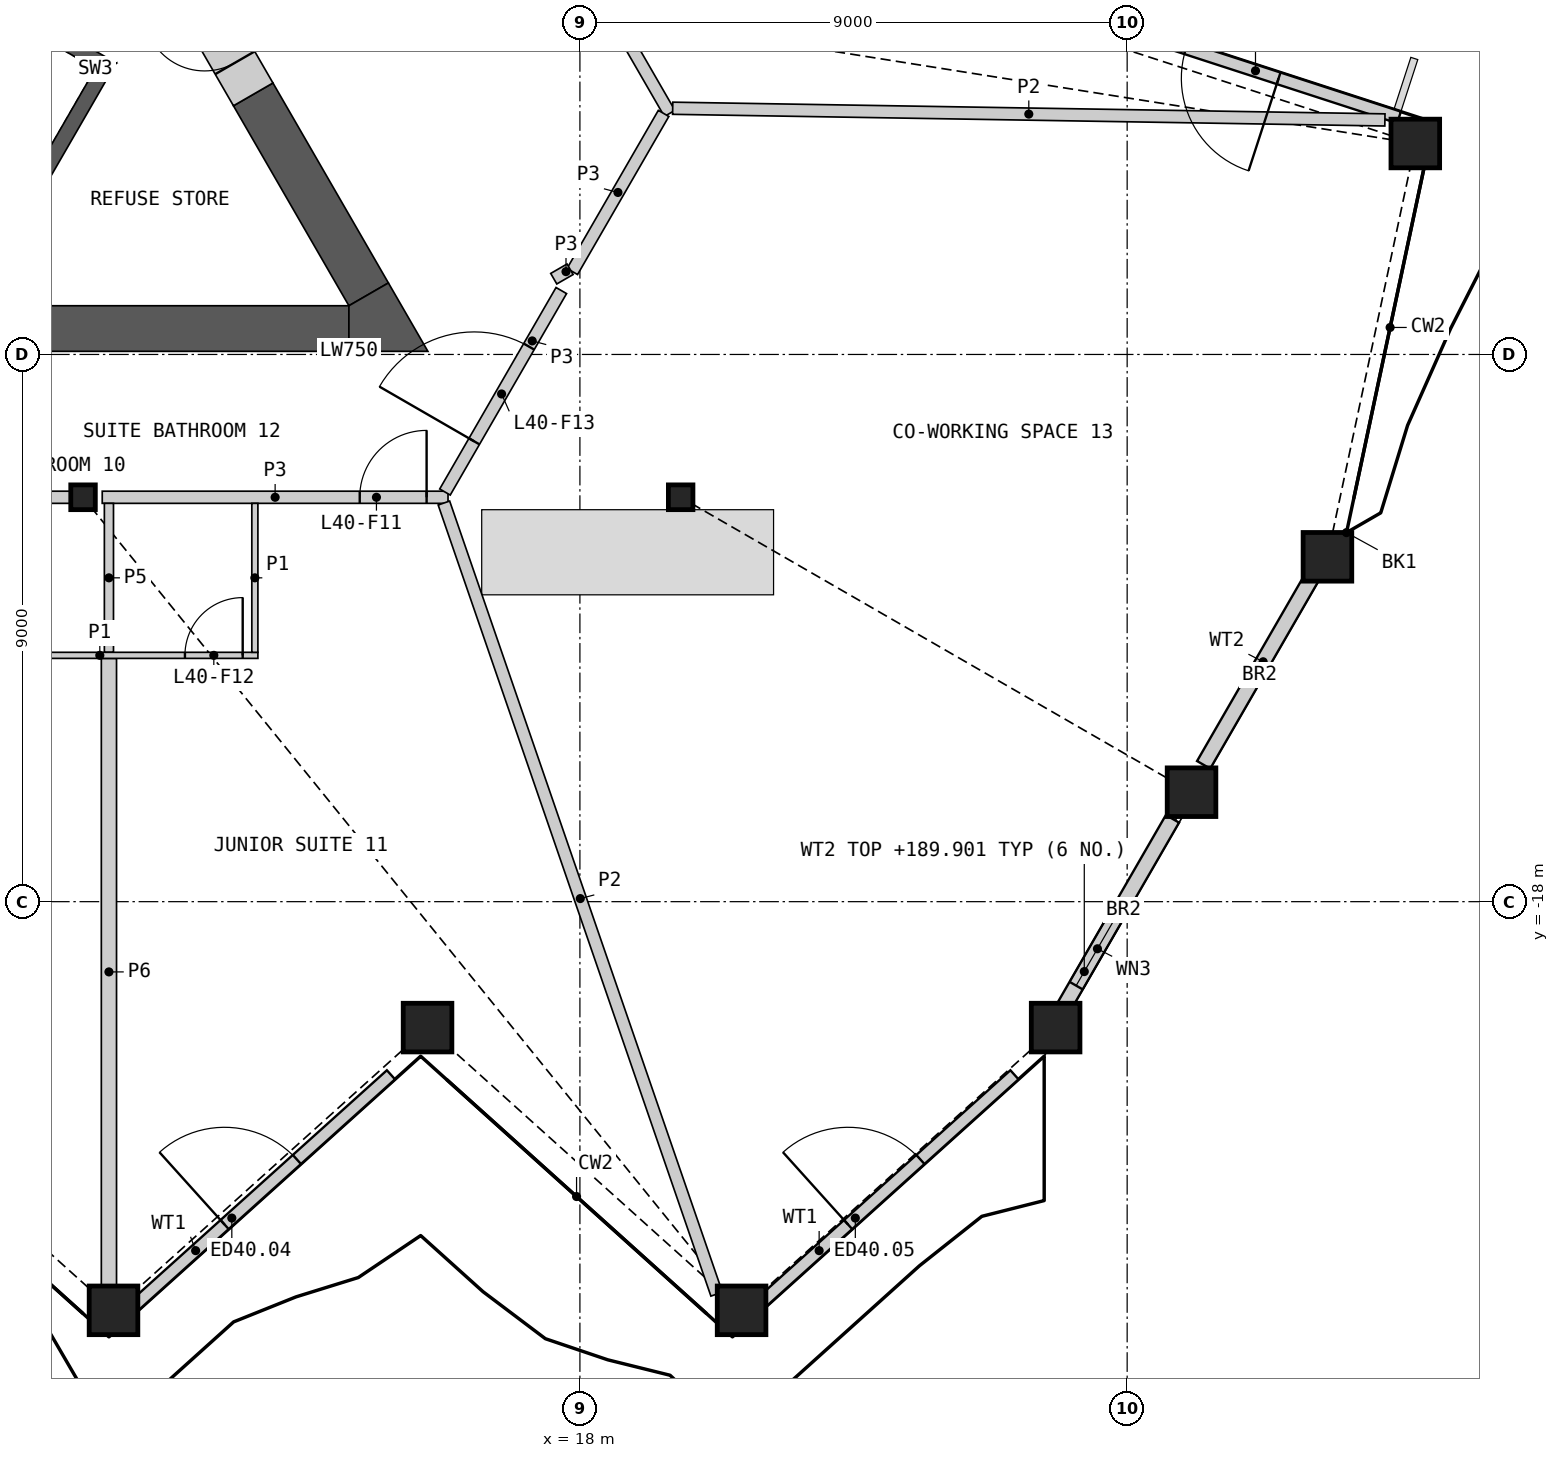
"""IFC4 building model, lengths in metres.
Left out: names, types, materials, properties, quantities, classifications, styles, units other than length and angle.
Written with IfcOpenShell. Run it as: python <this file> out.ifc"""

import sys

from ifc_helpers import new_model, si_unit, direction, frame, frame_2d, origin, origin_2d, place, context, subcontext, project, spatial, polyline, rectangle, hollow_rectangle, i_section, outline, extrude, element, fill, save


model = new_model("IFC4")
c1 = context("Model", 3, precision=1e-05, world=origin(), true_north=direction((0.0, 1.0)))
c2 = subcontext(c1, "Body", "Model", "MODEL_VIEW")
j1 = project(units=[si_unit("LENGTHUNIT", "METRE"), si_unit("PLANEANGLEUNIT", "RADIAN")], contexts=[c1])
p1 = place(None, origin())
s1 = spatial("IfcSite", under=j1, at=p1, CompositionType="ELEMENT")
p2 = place(p1, origin())
s2 = spatial("IfcBuilding", under=s1, at=p2, CompositionType="ELEMENT")
p3 = place(p2, frame((0.0, 0.0, 187.2)))
s3 = spatial("IfcBuildingStorey", under=s2, at=p3, CompositionType="ELEMENT", Elevation=187.2)
for number, where, z_axis, x_axis in (
    (1, (10.329, -24.722, 0.0), (0.0, 0.0, 1.0), (1.0, 0.0, 0.0)),
    (2, (15.494, -20.071, 0.0), (0.0, 0.0, 1.0), (1.0, 0.0, 0.0)),
    (3, (20.659, -24.722, 0.0), (0.0, 0.0, 1.0), (1.0, 0.0, 0.0)),
    (4, (25.823, -20.071, 0.0), (0.0, 0.0, 1.0), (1.0, 0.0, 0.0)),
    (5, (28.059, -16.2, 0.0), (0.0, 0.0, 1.0), (1.0, 0.0, 0.0)),
    (6, (30.294, -12.328, 0.0), (0.0, 0.0, 1.0), (1.0, 0.0, 0.0)),
    (7, (31.739, -5.53, 0.0), (0.0, 0.0, 1.0), (1.0, 0.0, 0.0)),
):
    element("IfcColumn", number, at=place(p3, frame(where, z_axis=z_axis, x_axis=x_axis)), inside=s3, PredefinedType="COLUMN", context=c2, shape_type="SweptSolid", body=[
        extrude(hollow_rectangle(XDim=0.8, YDim=0.8, WallThickness=0.05, at=origin_2d()), origin(), (0.0, 0.0, 1.0), 3.6),
    ])
for number, where, z_axis, x_axis in (
    (8, (9.828, -11.349, 0.0), (0.0, 0.0, 1.0), (1.0, 0.0, 0.0)),
    (9, (19.657, -11.349, 0.0), (0.0, 0.0, 1.0), (1.0, 0.0, 0.0)),
):
    element("IfcColumn", number, at=place(p3, frame(where, z_axis=z_axis, x_axis=x_axis)), inside=s3, PredefinedType="COLUMN", context=c2, shape_type="SweptSolid", body=[
        extrude(i_section(OverallWidth=0.404, OverallDepth=0.407, WebThickness=0.027, FlangeThickness=0.044, at=origin_2d()), origin(), (0.0, 0.0, 1.0), 3.6),
    ])
p4 = place(p3, frame((10.609, -24.704, 0.0), z_axis=(0.0, 0.0, 1.0), x_axis=(0.743140362926, 0.669135562491, 0.0)))
e10 = element("IfcWall", 10, at=p4, inside=s3, PredefinedType="SOLIDWALL", context=c2, shape_type="SweptSolid", body=[
    extrude(rectangle(XDim=5.763, YDim=0.2, at=frame_2d((2.882, 0.0))), origin(), (0.0, 0.0, 1.0), 2.701),
])
p5 = place(p4, frame((2.082, 0.0, 0.0)))
e11 = element("IfcOpeningElement", 11, at=p5, cuts=e10, PredefinedType="OPENING", context=c2, shape_type="SweptSolid", body=[
    extrude(rectangle(XDim=1.6, YDim=2.4, at=frame_2d((0.8, 1.2))), frame((0.0, 0.11, 0.0), z_axis=(0.0, -1.0, 0.0), x_axis=(1.0, 0.0, 0.0)), (0.0, 0.0, 1.0), 0.22),
])
p6 = place(p3, frame((20.864, -24.704, 0.0), z_axis=(0.0, 0.0, 1.0), x_axis=(0.743140362926, 0.669135562491, 0.0)))
e12 = element("IfcWall", 12, at=p6, inside=s3, PredefinedType="SOLIDWALL", context=c2, shape_type="SweptSolid", body=[
    extrude(rectangle(XDim=5.763, YDim=0.2, at=frame_2d((2.882, 0.0))), origin(), (0.0, 0.0, 1.0), 2.701),
])
p7 = place(p6, frame((2.082, 0.0, 0.0)))
e13 = element("IfcOpeningElement", 13, at=p7, cuts=e12, PredefinedType="OPENING", context=c2, shape_type="SweptSolid", body=[
    extrude(rectangle(XDim=1.6, YDim=2.4, at=frame_2d((0.8, 1.2))), frame((0.0, 0.11, 0.0), z_axis=(0.0, -1.0, 0.0), x_axis=(1.0, 0.0, 0.0)), (0.0, 0.0, 1.0), 0.22),
])
p8 = place(p3, frame((25.811, -19.987, 0.0), z_axis=(0.0, 0.0, 1.0), x_axis=(0.499981047344, 0.866036345829, 0.0)))
e14 = element("IfcWall", 14, at=p8, inside=s3, PredefinedType="SOLIDWALL", context=c2, shape_type="SweptSolid", body=[
    extrude(rectangle(XDim=3.868, YDim=0.25, at=frame_2d((1.934, 0.0))), origin(), (0.0, 0.0, 1.0), 2.701),
])
p9 = place(p8, frame((0.7, 0.0, 1.7)))
e15 = element("IfcOpeningElement", 15, at=p9, cuts=e14, PredefinedType="OPENING", context=c2, shape_type="SweptSolid", body=[
    extrude(rectangle(XDim=1.4, YDim=0.8, at=frame_2d((0.7, 0.4))), frame((0.0, 0.135, 0.0), z_axis=(0.0, -1.0, 0.0), x_axis=(1.0, 0.0, 0.0)), (0.0, 0.0, 1.0), 0.27),
])
p10 = place(p3, frame((28.258, -15.75, 0.0), z_axis=(0.0, 0.0, 1.0), x_axis=(0.499995984904, 0.866027721889, 0.0)))
e16 = element("IfcWall", 16, at=p10, inside=s3, PredefinedType="SOLIDWALL", context=c2, shape_type="SweptSolid", body=[
    extrude(rectangle(XDim=3.915, YDim=0.25, at=frame_2d((1.957, 0.0))), origin(), (0.0, 0.0, 1.0), 2.701),
])
p11 = place(p3, frame((31.471, -5.101, 0.0), z_axis=(0.0, 0.0, 1.0), x_axis=(-0.951053678976, 0.30902572661, 0.0)))
e17 = element("IfcWall", 17, at=p11, inside=s3, PredefinedType="SOLIDWALL", context=c2, shape_type="SweptSolid", body=[
    extrude(rectangle(XDim=5.763, YDim=0.2, at=frame_2d((2.882, 0.0))), origin(), (0.0, 0.0, 1.0), 2.701),
])
p12 = place(p11, frame((2.082, 0.0, 0.0)))
e18 = element("IfcOpeningElement", 18, at=p12, cuts=e17, PredefinedType="OPENING", context=c2, shape_type="SweptSolid", body=[
    extrude(rectangle(XDim=1.6, YDim=2.4, at=frame_2d((0.8, 1.2))), frame((0.0, 0.11, 0.0), z_axis=(0.0, -1.0, 0.0), x_axis=(1.0, 0.0, 0.0)), (0.0, 0.0, 1.0), 0.22),
])
p13 = place(p3, origin())
e19 = element("IfcWall", 19, at=p13, inside=s3, PredefinedType="SHEAR", context=c2, shape_type="SweptSolid", body=[
    extrude(outline(polyline([(8.83, -6.881), (10.374, -4.206), (10.032, -4.298), (8.738, -6.539), (8.83, -6.881)])), origin(), (0.0, 0.0, 1.0), 3.25),
])
p14 = place(p3, origin())
e20 = element("IfcWall", 20, at=p14, inside=s3, PredefinedType="SHEAR", context=c2, shape_type="SweptSolid", body=[
    extrude(outline(polyline([(10.032, -4.298), (10.374, -4.206), (5.307, -1.281), (5.182, -1.498), (10.032, -4.298)])), origin(), (0.0, 0.0, 1.0), 3.25),
])
p15 = place(p3, frame((4.48, -8.574, 0.0), z_axis=(0.0, 0.0, 1.0), x_axis=(1.0, 0.0, 0.0)))
e21 = element("IfcWall", 21, at=p15, inside=s3, PredefinedType="SHEAR", context=c2, shape_type="SweptSolid", body=[
    extrude(rectangle(XDim=9.721, YDim=0.75, at=frame_2d((4.86, 0.0))), origin(), (0.0, 0.0, 1.0), 3.25),
])
p16 = place(p3, frame((14.526, -8.011, 0.0), z_axis=(0.0, 0.0, 1.0), x_axis=(-0.499996970966, 0.866027152591, 0.0)))
e22 = element("IfcWall", 22, at=p16, inside=s3, PredefinedType="SHEAR", context=c2, shape_type="SweptSolid", body=[
    extrude(rectangle(XDim=3.798, YDim=0.75, at=frame_2d((1.899, 0.0))), origin(), (0.0, 0.0, 1.0), 3.25),
])
p17 = place(p3, origin())
e23 = element("IfcWall", 23, at=p17, inside=s3, PredefinedType="SHEAR", context=c2, shape_type="SweptSolid", body=[
    extrude(outline(polyline([(14.201, -8.949), (14.201, -8.199), (14.851, -7.824), (15.5, -8.949), (14.201, -8.949)])), origin(), (0.0, 0.0, 1.0), 3.25),
])
p18 = place(p3, frame((12.627, -4.722, 0.0), z_axis=(0.0, 0.0, 1.0), x_axis=(-0.499946605688, 0.86605622881, 0.0)))
e24 = element("IfcWall", 24, at=p18, inside=s3, PredefinedType="SHEAR", context=c2, shape_type="SweptSolid", body=[
    extrude(rectangle(XDim=2.2, YDim=0.75, at=frame_2d((1.1, 0.0))), origin(), (0.0, 0.0, 1.0), 3.25),
])
p19 = place(p18, frame((0.6, 0.0, 0.0)))
e25 = element("IfcOpeningElement", 25, at=p19, cuts=e24, PredefinedType="OPENING", context=c2, shape_type="SweptSolid", body=[
    extrude(rectangle(XDim=1.0, YDim=2.1, at=frame_2d((0.5, 1.05))), frame((0.0, 0.385, 0.0), z_axis=(0.0, -1.0, 0.0), x_axis=(1.0, 0.0, 0.0)), (0.0, 0.0, 1.0), 0.77),
])
p20 = place(p3, frame((5.377, 19.385, 0.0), z_axis=(0.0, 0.0, 1.0), x_axis=(0.500000757641, -0.86602496636, 0.0)))
e26 = element("IfcWall", 26, at=p20, inside=s3, PredefinedType="PARTITIONING", context=c2, shape_type="SweptSolid", body=[
    extrude(rectangle(XDim=28.198, YDim=0.2, at=frame_2d((14.099, 0.0))), origin(), (0.0, 0.0, 1.0), 3.25),
])
p21 = place(p20, frame((22.735, 0.0, 0.0)))
e27 = element("IfcOpeningElement", 27, at=p21, cuts=e26, PredefinedType="OPENING", context=c2, shape_type="SweptSolid", body=[
    extrude(rectangle(XDim=1.8, YDim=2.1, at=frame_2d((0.9, 1.05))), frame((0.0, 0.11, 0.0), z_axis=(0.0, -1.0, 0.0), x_axis=(1.0, 0.0, 0.0)), (0.0, 0.0, 1.0), 0.22),
])
p22 = place(p20, frame((14.402, 0.0, 0.0)))
e28 = element("IfcOpeningElement", 28, at=p22, cuts=e26, PredefinedType="OPENING", context=c2, shape_type="SweptSolid", body=[
    extrude(rectangle(XDim=1.0, YDim=2.1, at=frame_2d((0.5, 1.05))), frame((0.0, 0.11, 0.0), z_axis=(0.0, -1.0, 0.0), x_axis=(1.0, 0.0, 0.0)), (0.0, 0.0, 1.0), 0.22),
])
p23 = place(p20, frame((12.796, 0.0, 0.0)))
e29 = element("IfcOpeningElement", 29, at=p23, cuts=e26, PredefinedType="OPENING", context=c2, shape_type="SweptSolid", body=[
    extrude(rectangle(XDim=1.0, YDim=2.1, at=frame_2d((0.5, 1.05))), frame((0.0, 0.11, 0.0), z_axis=(0.0, -1.0, 0.0), x_axis=(1.0, 0.0, 0.0)), (0.0, 0.0, 1.0), 0.22),
])
p24 = place(p20, frame((4.164, 0.0, 0.0)))
e30 = element("IfcOpeningElement", 30, at=p24, cuts=e26, PredefinedType="OPENING", context=c2, shape_type="SweptSolid", body=[
    extrude(rectangle(XDim=1.0, YDim=2.1, at=frame_2d((0.5, 1.05))), frame((0.0, 0.11, 0.0), z_axis=(0.0, -1.0, 0.0), x_axis=(1.0, 0.0, 0.0)), (0.0, 0.0, 1.0), 0.22),
])
p25 = place(p20, frame((1.452, 0.0, 0.0)))
e31 = element("IfcOpeningElement", 31, at=p25, cuts=e26, PredefinedType="OPENING", context=c2, shape_type="SweptSolid", body=[
    extrude(rectangle(XDim=0.95, YDim=2.1, at=frame_2d((0.475, 1.05))), frame((0.0, 0.11, 0.0), z_axis=(0.0, -1.0, 0.0), x_axis=(1.0, 0.0, 0.0)), (0.0, 0.0, 1.0), 0.22),
])
p26 = place(p3, frame((10.254, -24.312, 0.0), z_axis=(0.0, 0.0, 1.0), x_axis=(0.0, 1.0, 0.0)))
e32 = element("IfcWall", 32, at=p26, inside=s3, PredefinedType="PARTITIONING", context=c2, shape_type="SweptSolid", body=[
    extrude(rectangle(XDim=10.313, YDim=0.25, at=frame_2d((5.156, 0.0))), origin(), (0.0, 0.0, 1.0), 2.404),
])
p27 = place(p3, frame((0.214, -11.349, 0.0), z_axis=(0.0, 0.0, 1.0), x_axis=(1.0, 0.0, 0.0)))
e33 = element("IfcWall", 33, at=p27, inside=s3, PredefinedType="PARTITIONING", context=c2, shape_type="SweptSolid", body=[
    extrude(rectangle(XDim=9.401, YDim=0.2, at=frame_2d((4.701, 0.0))), origin(), (0.0, 0.0, 1.0), 3.25),
])
p28 = place(p27, frame((3.551, 0.0, 0.0)))
e34 = element("IfcOpeningElement", 34, at=p28, cuts=e33, PredefinedType="OPENING", context=c2, shape_type="SweptSolid", body=[
    extrude(rectangle(XDim=1.0, YDim=2.1, at=frame_2d((0.5, 1.05))), frame((0.0, 0.11, 0.0), z_axis=(0.0, -1.0, 0.0), x_axis=(1.0, 0.0, 0.0)), (0.0, 0.0, 1.0), 0.22),
])
p29 = place(p27, frame((5.251, 0.0, 0.0)))
e35 = element("IfcOpeningElement", 35, at=p29, cuts=e33, PredefinedType="OPENING", context=c2, shape_type="SweptSolid", body=[
    extrude(rectangle(XDim=1.0, YDim=2.1, at=frame_2d((0.5, 1.05))), frame((0.0, 0.11, 0.0), z_axis=(0.0, -1.0, 0.0), x_axis=(1.0, 0.0, 0.0)), (0.0, 0.0, 1.0), 0.22),
])
p30 = place(p3, frame((10.144, -11.349, 0.0), z_axis=(0.0, 0.0, 1.0), x_axis=(1.0, 0.0, 0.0)))
e36 = element("IfcWall", 36, at=p30, inside=s3, PredefinedType="PARTITIONING", context=c2, shape_type="SweptSolid", body=[
    extrude(rectangle(XDim=5.687, YDim=0.2, at=frame_2d((2.843, 0.0))), origin(), (0.0, 0.0, 1.0), 3.25),
])
p31 = place(p30, frame((4.235, 0.0, 0.0)))
e37 = element("IfcOpeningElement", 37, at=p31, cuts=e36, PredefinedType="OPENING", context=c2, shape_type="SweptSolid", body=[
    extrude(rectangle(XDim=1.1, YDim=2.1, at=frame_2d((0.55, 1.05))), frame((0.0, 0.11, 0.0), z_axis=(0.0, -1.0, 0.0), x_axis=(1.0, 0.0, 0.0)), (0.0, 0.0, 1.0), 0.22),
])
p32 = place(p3, frame((15.781, -11.262, 0.0), z_axis=(0.0, 0.0, 1.0), x_axis=(0.499989446428, 0.866031496806, 0.0)))
e38 = element("IfcWall", 38, at=p32, inside=s3, PredefinedType="PARTITIONING", context=c2, shape_type="SweptSolid", body=[
    extrude(rectangle(XDim=3.826, YDim=0.2, at=frame_2d((1.913, 0.0))), origin(), (0.0, 0.0, 1.0), 3.25),
])
p33 = place(p32, frame((0.962, 0.0, 0.0)))
e39 = element("IfcOpeningElement", 39, at=p33, cuts=e38, PredefinedType="OPENING", context=c2, shape_type="SweptSolid", body=[
    extrude(rectangle(XDim=1.8, YDim=2.1, at=frame_2d((0.9, 1.05))), frame((0.0, 0.11, 0.0), z_axis=(0.0, -1.0, 0.0), x_axis=(1.0, 0.0, 0.0)), (0.0, 0.0, 1.0), 0.22),
])
p34 = place(p3, frame((17.875, -7.635, 0.0), z_axis=(0.0, 0.0, 1.0), x_axis=(0.499952404951, 0.866052881055, 0.0)))
e40 = element("IfcWall", 40, at=p34, inside=s3, PredefinedType="PARTITIONING", context=c2, shape_type="SweptSolid", body=[
    extrude(rectangle(XDim=3.002, YDim=0.2, at=frame_2d((1.501, 0.0))), origin(), (0.0, 0.0, 1.0), 3.25),
])
p35 = place(p3, frame((17.57, -7.754, 0.0), z_axis=(0.0, 0.0, 1.0), x_axis=(0.866054481515, 0.499949632511, 0.0)))
e41 = element("IfcWall", 41, at=p35, inside=s3, PredefinedType="PARTITIONING", context=c2, shape_type="SweptSolid", body=[
    extrude(rectangle(XDim=0.31, YDim=0.2, at=frame_2d((0.155, 0.0))), origin(), (0.0, 0.0, 1.0), 3.25),
])
p36 = place(p3, frame((15.763, -11.444, 0.0), z_axis=(0.0, 0.0, 1.0), x_axis=(0.325902118519, -0.945403516571, 0.0)))
e42 = element("IfcWall", 42, at=p36, inside=s3, PredefinedType="PARTITIONING", context=c2, shape_type="SweptSolid", body=[
    extrude(rectangle(XDim=13.763, YDim=0.2, at=frame_2d((6.881, 0.0))), origin(), (0.0, 0.0, 1.0), 2.404),
])
p37 = place(p3, frame((19.526, -4.95, 0.0), z_axis=(0.0, 0.0, 1.0), x_axis=(0.99986514458, -0.016422321819, 0.0)))
e43 = element("IfcWall", 43, at=p37, inside=s3, PredefinedType="PARTITIONING", context=c2, shape_type="SweptSolid", body=[
    extrude(rectangle(XDim=11.715, YDim=0.2, at=frame_2d((5.857, 0.0))), origin(), (0.0, 0.0, 1.0), 2.404),
])
p38 = place(p3, frame((10.254, -13.899, 0.0), z_axis=(0.0, 0.0, 1.0), x_axis=(0.0, 1.0, 0.0)))
e44 = element("IfcWall", 44, at=p38, inside=s3, PredefinedType="PLUMBINGWALL", context=c2, shape_type="SweptSolid", body=[
    extrude(rectangle(XDim=2.45, YDim=0.15, at=frame_2d((1.225, 0.0))), origin(), (0.0, 0.0, 1.0), 2.404),
])
p39 = place(p3, frame((7.504, -13.949, 0.0), z_axis=(0.0, 0.0, 1.0), x_axis=(1.0, 0.0, 0.0)))
e45 = element("IfcWall", 45, at=p39, inside=s3, PredefinedType="PARTITIONING", context=c2, shape_type="SweptSolid", body=[
    extrude(rectangle(XDim=5.2, YDim=0.1, at=frame_2d((2.6, 0.0))), origin(), (0.0, 0.0, 1.0), 2.404),
])
p40 = place(p39, frame((0.25, 0.0, 0.0)))
e46 = element("IfcOpeningElement", 46, at=p40, cuts=e45, PredefinedType="OPENING", context=c2, shape_type="SweptSolid", body=[
    extrude(rectangle(XDim=0.95, YDim=2.1, at=frame_2d((0.475, 1.05))), frame((0.0, 0.06, 0.0), z_axis=(0.0, -1.0, 0.0), x_axis=(1.0, 0.0, 0.0)), (0.0, 0.0, 1.0), 0.12),
])
p41 = place(p39, frame((4.0, 0.0, 0.0)))
e47 = element("IfcOpeningElement", 47, at=p41, cuts=e45, PredefinedType="OPENING", context=c2, shape_type="SweptSolid", body=[
    extrude(rectangle(XDim=0.95, YDim=2.1, at=frame_2d((0.475, 1.05))), frame((0.0, 0.06, 0.0), z_axis=(0.0, -1.0, 0.0), x_axis=(1.0, 0.0, 0.0)), (0.0, 0.0, 1.0), 0.12),
])
p42 = place(p3, frame((12.654, -13.899, 0.0), z_axis=(0.0, 0.0, 1.0), x_axis=(0.0, 1.0, 0.0)))
e48 = element("IfcWall", 48, at=p42, inside=s3, PredefinedType="PARTITIONING", context=c2, shape_type="SweptSolid", body=[
    extrude(rectangle(XDim=2.45, YDim=0.1, at=frame_2d((1.225, 0.0))), origin(), (0.0, 0.0, 1.0), 2.404),
])
p43 = place(p5, origin())
e49 = element("IfcDoor", 49, at=p43, inside=s3, OperationType="DOUBLE_DOOR_SINGLE_SWING", PredefinedType="DOOR", context=c2, shape_type="SweptSolid", body=[
    extrude(rectangle(XDim=1.6, YDim=2.4, at=frame_2d((0.8, 1.2))), frame((0.0, 0.025, 0.0), z_axis=(0.0, -1.0, 0.0), x_axis=(1.0, 0.0, 0.0)), (0.0, 0.0, 1.0), 0.05),
])
fill(e11, e49)
p44 = place(p7, origin())
e50 = element("IfcDoor", 50, at=p44, inside=s3, OperationType="DOUBLE_DOOR_SINGLE_SWING", PredefinedType="DOOR", context=c2, shape_type="SweptSolid", body=[
    extrude(rectangle(XDim=1.6, YDim=2.4, at=frame_2d((0.8, 1.2))), frame((0.0, 0.025, 0.0), z_axis=(0.0, -1.0, 0.0), x_axis=(1.0, 0.0, 0.0)), (0.0, 0.0, 1.0), 0.05),
])
fill(e13, e50)
p45 = place(p9, origin())
e51 = element("IfcWindow", 51, at=p45, inside=s3, PartitioningType="SINGLE_PANEL", PredefinedType="WINDOW", context=c2, shape_type="SweptSolid", body=[
    extrude(rectangle(XDim=1.4, YDim=0.8, at=frame_2d((0.7, 0.4))), frame((0.0, 0.03, 0.0), z_axis=(0.0, -1.0, 0.0), x_axis=(1.0, 0.0, 0.0)), (0.0, 0.0, 1.0), 0.06),
])
fill(e15, e51)
p46 = place(p12, origin())
e52 = element("IfcDoor", 52, at=p46, inside=s3, OperationType="DOUBLE_DOOR_SINGLE_SWING", PredefinedType="DOOR", context=c2, shape_type="SweptSolid", body=[
    extrude(rectangle(XDim=1.6, YDim=2.4, at=frame_2d((0.8, 1.2))), frame((0.0, 0.025, 0.0), z_axis=(0.0, -1.0, 0.0), x_axis=(1.0, 0.0, 0.0)), (0.0, 0.0, 1.0), 0.05),
])
fill(e18, e52)
p47 = place(p19, origin())
e53 = element("IfcDoor", 53, at=p47, inside=s3, OperationType="SINGLE_SWING_RIGHT", PredefinedType="DOOR", context=c2, shape_type="SweptSolid", body=[
    extrude(rectangle(XDim=1.0, YDim=2.1, at=frame_2d((0.5, 1.05))), frame((0.0, 0.13, 0.0), z_axis=(0.0, -1.0, 0.0), x_axis=(1.0, 0.0, 0.0)), (0.0, 0.0, 1.0), 0.05),
])
fill(e25, e53)
p48 = place(p31, origin())
e54 = element("IfcDoor", 54, at=p48, inside=s3, OperationType="SINGLE_SWING_RIGHT", PredefinedType="DOOR", context=c2, shape_type="SweptSolid", body=[
    extrude(rectangle(XDim=1.1, YDim=2.1, at=frame_2d((0.55, 1.05))), frame((0.0, 0.025, 0.0), z_axis=(0.0, -1.0, 0.0), x_axis=(1.0, 0.0, 0.0)), (0.0, 0.0, 1.0), 0.05),
])
fill(e37, e54)
p49 = place(p41, origin())
e55 = element("IfcDoor", 55, at=p49, inside=s3, OperationType="SINGLE_SWING_RIGHT", PredefinedType="DOOR", context=c2, shape_type="SweptSolid", body=[
    extrude(rectangle(XDim=0.95, YDim=2.1, at=frame_2d((0.475, 1.05))), frame((0.0, 0.025, 0.0), z_axis=(0.0, -1.0, 0.0), x_axis=(1.0, 0.0, 0.0)), (0.0, 0.0, 1.0), 0.05),
])
fill(e47, e55)
p50 = place(p33, origin())
e56 = element("IfcDoor", 56, at=p50, inside=s3, OperationType="DOUBLE_DOOR_SINGLE_SWING", PredefinedType="DOOR", context=c2, shape_type="SweptSolid", body=[
    extrude(rectangle(XDim=1.8, YDim=2.1, at=frame_2d((0.9, 1.05))), frame((0.0, 0.025, 0.0), z_axis=(0.0, -1.0, 0.0), x_axis=(1.0, 0.0, 0.0)), (0.0, 0.0, 1.0), 0.05),
])
fill(e39, e56)
save(model, sys.argv[1])
